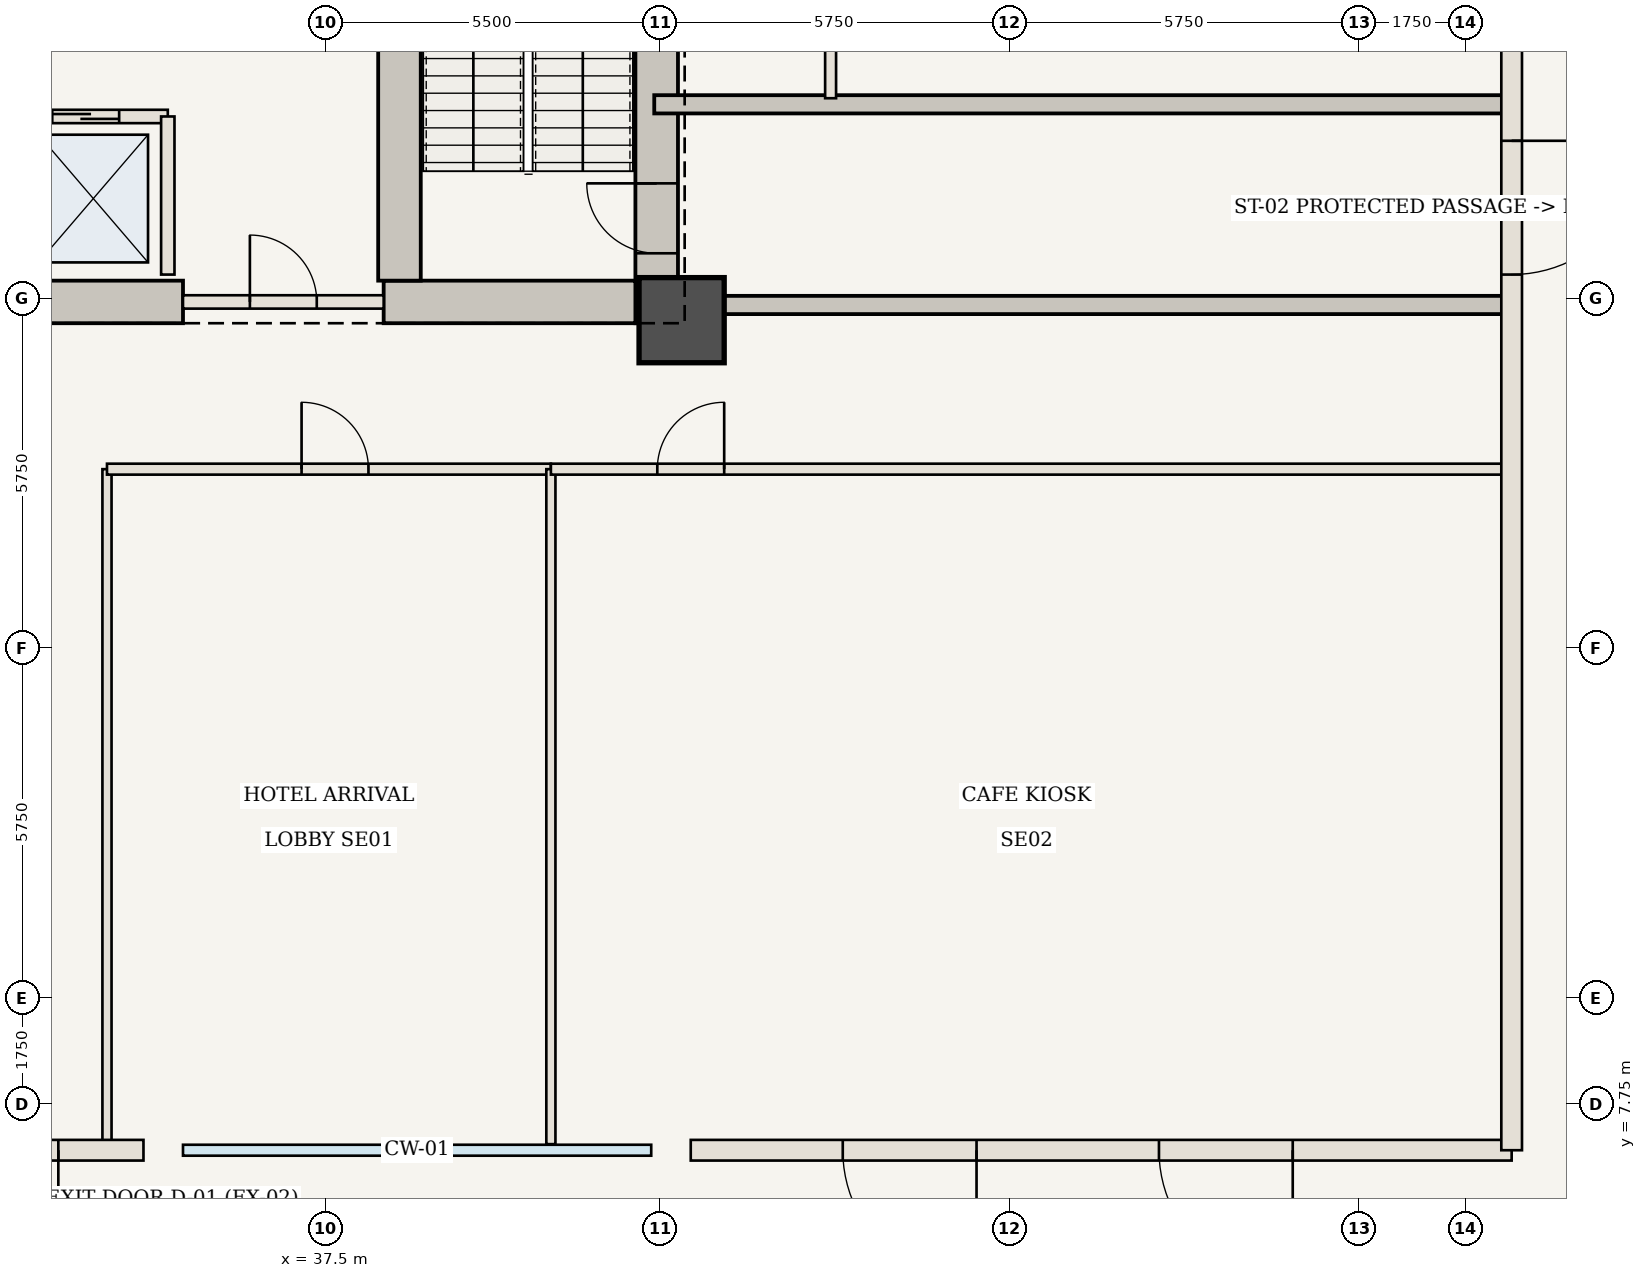
"""IFC4 building model, lengths in metres.
Left out: names, types, materials, properties, quantities, classifications, styles, units other than length and angle.
Written with IfcOpenShell. Run it as: python <this file> out.ifc"""

import sys

from ifc_helpers import new_model, si_unit, direction, frame, frame_2d, origin, origin_2d, place, context, subcontext, project, spatial, rectangle, extrude, element, fill, save


model = new_model("IFC4")
c1 = context("Model", 3, precision=1e-05, world=origin(), true_north=direction((0.0, 1.0)))
c2 = subcontext(c1, "Body", "Model", "MODEL_VIEW")
j1 = project(units=[si_unit("LENGTHUNIT", "METRE"), si_unit("PLANEANGLEUNIT", "RADIAN")], contexts=[c1])
p1 = place(None, origin())
s1 = spatial("IfcSite", under=j1, at=p1, CompositionType="ELEMENT")
p2 = place(p1, origin())
s2 = spatial("IfcBuilding", under=s1, at=p2, CompositionType="ELEMENT")
p3 = place(p2, origin())
s3 = spatial("IfcBuildingStorey", under=s2, at=p3, CompositionType="ELEMENT", Elevation=0.0)
p4 = place(p3, frame((42.94, 20.6, 0.0), z_axis=(0.0, 0.0, 1.0), x_axis=(0.0, 1.0, 0.0)))
e1 = element("IfcWall", 1, at=p4, inside=s3, PredefinedType="SHEAR", context=c2, shape_type="SweptSolid", body=[
    extrude(rectangle(XDim=10.0, YDim=0.7, at=frame_2d((5.0, 0.0))), origin(), (0.0, 0.0, 1.0), 6.65),
])
p5 = place(p4, frame((1.15, 0.0, 0.0)))
e2 = element("IfcOpeningElement", 2, at=p5, cuts=e1, PredefinedType="OPENING", context=c2, shape_type="SweptSolid", body=[
    extrude(rectangle(XDim=1.15, YDim=2.15, at=frame_2d((0.575, 1.075))), frame((0.0, 0.36, 0.0), z_axis=(0.0, -1.0, 0.0), x_axis=(1.0, 0.0, 0.0)), (0.0, 0.0, 1.0), 0.72),
])
p6 = place(p3, frame((21.41, 20.95, 0.0), z_axis=(0.0, 0.0, 1.0), x_axis=(1.0, 0.0, 0.0)))
e3 = element("IfcWall", 3, at=p6, inside=s3, PredefinedType="SHEAR", context=c2, shape_type="SweptSolid", body=[
    extrude(rectangle(XDim=13.74, YDim=0.7, at=frame_2d((6.87, 0.0))), origin(), (0.0, 0.0, 1.0), 6.65),
])
p7 = place(p3, frame((38.45, 20.95, 0.0), z_axis=(0.0, 0.0, 1.0), x_axis=(1.0, 0.0, 0.0)))
e4 = element("IfcWall", 4, at=p7, inside=s3, PredefinedType="SHEAR", context=c2, shape_type="SweptSolid", body=[
    extrude(rectangle(XDim=4.14, YDim=0.7, at=frame_2d((2.07, 0.0))), origin(), (0.0, 0.0, 1.0), 6.65),
])
p8 = place(p3, frame((38.71, 21.3, 0.0), z_axis=(0.0, 0.0, 1.0), x_axis=(0.0, 1.0, 0.0)))
e5 = element("IfcWall", 5, at=p8, inside=s3, PredefinedType="SHEAR", context=c2, shape_type="SweptSolid", body=[
    extrude(rectangle(XDim=9.3, YDim=0.7, at=frame_2d((4.65, 0.0))), origin(), (0.0, 0.0, 1.0), 6.65),
])
p9 = place(p3, frame((43.35, 20.65, 0.0), z_axis=(0.0, 0.0, 1.0), x_axis=(1.0, 0.0, 0.0)))
e6 = element("IfcColumn", 6, at=p9, inside=s3, PredefinedType="COLUMN", context=c2, shape_type="SweptSolid", body=[
    extrude(rectangle(XDim=1.4, YDim=1.4, at=origin_2d()), origin(), (0.0, 0.0, 1.0), 6.65),
])
p10 = place(p3, frame((35.15, 20.95, 0.0), z_axis=(0.0, 0.0, 1.0), x_axis=(1.0, 0.0, 0.0)))
e7 = element("IfcWall", 7, at=p10, inside=s3, PredefinedType="STANDARD", context=c2, shape_type="SweptSolid", body=[
    extrude(rectangle(XDim=3.3, YDim=0.22, at=frame_2d((1.65, 0.0))), origin(), (0.0, 0.0, 1.0), 6.41),
])
p11 = place(p10, frame((1.1, 0.0, 0.0)))
e8 = element("IfcOpeningElement", 8, at=p11, cuts=e7, PredefinedType="OPENING", context=c2, shape_type="SweptSolid", body=[
    extrude(rectangle(XDim=1.1, YDim=2.15, at=frame_2d((0.55, 1.075))), frame((0.0, 0.12, 0.0), z_axis=(0.0, -1.0, 0.0), x_axis=(1.0, 0.0, 0.0)), (0.0, 0.0, 1.0), 0.24),
])
p12 = place(p3, frame((25.65, 24.0, 0.0), z_axis=(0.0, 0.0, 1.0), x_axis=(1.0, 0.0, 0.0)))
e9 = element("IfcWall", 9, at=p12, inside=s3, PredefinedType="STANDARD", context=c2, shape_type="SweptSolid", body=[
    extrude(rectangle(XDim=9.25, YDim=0.22, at=frame_2d((4.625, 0.0))), origin(), (0.0, 0.0, 1.0), 6.41),
])
p13 = place(p12, frame((0.58, 0.0, 0.0)))
e10 = element("IfcOpeningElement", 10, at=p13, cuts=e9, PredefinedType="OPENING", context=c2, shape_type="SweptSolid", body=[
    extrude(rectangle(XDim=1.1, YDim=2.15, at=frame_2d((0.55, 1.075))), frame((0.0, 0.12, 0.0), z_axis=(0.0, -1.0, 0.0), x_axis=(1.0, 0.0, 0.0)), (0.0, 0.0, 1.0), 0.24),
])
p14 = place(p12, frame((2.75, 0.0, 0.0)))
e11 = element("IfcOpeningElement", 11, at=p14, cuts=e9, PredefinedType="OPENING", context=c2, shape_type="SweptSolid", body=[
    extrude(rectangle(XDim=1.1, YDim=2.15, at=frame_2d((0.55, 1.075))), frame((0.0, 0.12, 0.0), z_axis=(0.0, -1.0, 0.0), x_axis=(1.0, 0.0, 0.0)), (0.0, 0.0, 1.0), 0.24),
])
p15 = place(p12, frame((5.05, 0.0, 0.0)))
e12 = element("IfcOpeningElement", 12, at=p15, cuts=e9, PredefinedType="OPENING", context=c2, shape_type="SweptSolid", body=[
    extrude(rectangle(XDim=1.1, YDim=2.15, at=frame_2d((0.55, 1.075))), frame((0.0, 0.12, 0.0), z_axis=(0.0, -1.0, 0.0), x_axis=(1.0, 0.0, 0.0)), (0.0, 0.0, 1.0), 0.24),
])
p16 = place(p12, frame((7.35, 0.0, 0.0)))
e13 = element("IfcOpeningElement", 13, at=p16, cuts=e9, PredefinedType="OPENING", context=c2, shape_type="SweptSolid", body=[
    extrude(rectangle(XDim=1.1, YDim=2.15, at=frame_2d((0.55, 1.075))), frame((0.0, 0.12, 0.0), z_axis=(0.0, -1.0, 0.0), x_axis=(1.0, 0.0, 0.0)), (0.0, 0.0, 1.0), 0.24),
])
p17 = place(p3, frame((34.9, 21.4, 0.0), z_axis=(0.0, 0.0, 1.0), x_axis=(0.0, 1.0, 0.0)))
e14 = element("IfcWall", 14, at=p17, inside=s3, PredefinedType="STANDARD", context=c2, shape_type="SweptSolid", body=[
    extrude(rectangle(XDim=2.6, YDim=0.22, at=frame_2d((1.3, 0.0))), origin(), (0.0, 0.0, 1.0), 6.41),
])
for number, where, z_axis, x_axis in (
    (15, (42.9, 20.9, 0.0), (0.0, 0.0, 1.0), (1.0, 0.0, 0.0)),
    (16, (42.9, 24.2, 0.0), (0.0, 0.0, 1.0), (1.0, 0.0, 0.0)),
):
    element("IfcWall", number, at=place(p3, frame(where, z_axis=z_axis, x_axis=x_axis)), inside=s3, PredefinedType="SHEAR", context=c2, shape_type="SweptSolid", body=[
        extrude(rectangle(XDim=14.05, YDim=0.3, at=frame_2d((7.025, 0.0))), origin(), (0.0, 0.0, 1.0), 6.41),
    ])
p18 = place(p3, frame((33.9, 7.1, 0.0), z_axis=(0.0, 0.0, 1.0), x_axis=(0.0, 1.0, 0.0)))
e17 = element("IfcWall", 17, at=p18, inside=s3, PredefinedType="STANDARD", context=c2, shape_type="SweptSolid", body=[
    extrude(rectangle(XDim=11.1, YDim=0.15, at=frame_2d((5.55, 0.0))), origin(), (0.0, 0.0, 1.0), 6.41),
])
p19 = place(p3, frame((33.9, 18.2, 0.0), z_axis=(0.0, 0.0, 1.0), x_axis=(1.0, 0.0, 0.0)))
e18 = element("IfcWall", 18, at=p19, inside=s3, PredefinedType="STANDARD", context=c2, shape_type="SweptSolid", body=[
    extrude(rectangle(XDim=7.3, YDim=0.18, at=frame_2d((3.65, 0.0))), origin(), (0.0, 0.0, 1.0), 6.41),
])
p20 = place(p19, frame((3.2, 0.0, 0.0)))
e19 = element("IfcOpeningElement", 19, at=p20, cuts=e18, PredefinedType="OPENING", context=c2, shape_type="SweptSolid", body=[
    extrude(rectangle(XDim=1.1, YDim=2.15, at=frame_2d((0.55, 1.075))), frame((0.0, 0.1, 0.0), z_axis=(0.0, -1.0, 0.0), x_axis=(1.0, 0.0, 0.0)), (0.0, 0.0, 1.0), 0.2),
])
p21 = place(p3, frame((41.2, 7.1, 0.0), z_axis=(0.0, 0.0, 1.0), x_axis=(0.0, 1.0, 0.0)))
e20 = element("IfcWall", 20, at=p21, inside=s3, PredefinedType="STANDARD", context=c2, shape_type="SweptSolid", body=[
    extrude(rectangle(XDim=11.1, YDim=0.15, at=frame_2d((5.55, 0.0))), origin(), (0.0, 0.0, 1.0), 6.41),
])
p22 = place(p3, frame((41.2, 18.2, 0.0), z_axis=(0.0, 0.0, 1.0), x_axis=(1.0, 0.0, 0.0)))
e21 = element("IfcWall", 21, at=p22, inside=s3, PredefinedType="STANDARD", context=c2, shape_type="SweptSolid", body=[
    extrude(rectangle(XDim=15.65, YDim=0.18, at=frame_2d((7.825, 0.0))), origin(), (0.0, 0.0, 1.0), 6.41),
])
p23 = place(p22, frame((1.75, 0.0, 0.0)))
e22 = element("IfcOpeningElement", 22, at=p23, cuts=e21, PredefinedType="OPENING", context=c2, shape_type="SweptSolid", body=[
    extrude(rectangle(XDim=1.1, YDim=2.15, at=frame_2d((0.55, 1.075))), frame((0.0, 0.1, 0.0), z_axis=(0.0, -1.0, 0.0), x_axis=(1.0, 0.0, 0.0)), (0.0, 0.0, 1.0), 0.2),
])
p24 = place(p3, frame((45.8, 24.3, 0.0), z_axis=(0.0, 0.0, 1.0), x_axis=(0.0, 1.0, 0.0)))
e23 = element("IfcWall", 23, at=p24, inside=s3, PredefinedType="STANDARD", context=c2, shape_type="SweptSolid", body=[
    extrude(rectangle(XDim=10.7, YDim=0.18, at=frame_2d((5.35, 0.0))), origin(), (0.0, 0.0, 1.0), 6.41),
])
p25 = place(p24, frame((4.85, 0.0, 0.0)))
e24 = element("IfcOpeningElement", 24, at=p25, cuts=e23, PredefinedType="OPENING", context=c2, shape_type="SweptSolid", body=[
    extrude(rectangle(XDim=0.95, YDim=2.15, at=frame_2d((0.475, 1.075))), frame((0.0, 0.1, 0.0), z_axis=(0.0, -1.0, 0.0), x_axis=(1.0, 0.0, 0.0)), (0.0, 0.0, 1.0), 0.2),
])
p26 = place(p3, frame((34.5, 7.0, 0.0), z_axis=(0.0, 0.0, 1.0), x_axis=(-1.0, 0.0, 0.0)))
e25 = element("IfcWall", 25, at=p26, inside=s3, PredefinedType="USERDEFINED", context=c2, shape_type="SweptSolid", body=[
    extrude(rectangle(XDim=5.0, YDim=0.34, at=frame_2d((2.5, 0.0))), origin(), (0.0, 0.0, 1.0), 5.51),
])
p27 = place(p26, frame((1.4, 0.0, 0.0)))
e26 = element("IfcOpeningElement", 26, at=p27, cuts=e25, PredefinedType="OPENING", context=c2, shape_type="SweptSolid", body=[
    extrude(rectangle(XDim=2.2, YDim=2.4, at=frame_2d((1.1, 1.2))), frame((0.0, 0.18, 0.0), z_axis=(0.0, -1.0, 0.0), x_axis=(1.0, 0.0, 0.0)), (0.0, 0.0, 1.0), 0.36),
])
p28 = place(p3, frame((57.0, 7.0, 0.0), z_axis=(0.0, 0.0, 1.0), x_axis=(-1.0, 0.0, 0.0)))
e27 = element("IfcWall", 27, at=p28, inside=s3, PredefinedType="USERDEFINED", context=c2, shape_type="SweptSolid", body=[
    extrude(rectangle(XDim=13.5, YDim=0.34, at=frame_2d((6.75, 0.0))), origin(), (0.0, 0.0, 1.0), 5.51),
])
p29 = place(p28, frame((3.6, 0.0, 0.0)))
e28 = element("IfcOpeningElement", 28, at=p29, cuts=e27, PredefinedType="OPENING", context=c2, shape_type="SweptSolid", body=[
    extrude(rectangle(XDim=2.2, YDim=2.4, at=frame_2d((1.1, 1.2))), frame((0.0, 0.18, 0.0), z_axis=(0.0, -1.0, 0.0), x_axis=(1.0, 0.0, 0.0)), (0.0, 0.0, 1.0), 0.36),
])
p30 = place(p28, frame((8.8, 0.0, 0.0)))
e29 = element("IfcOpeningElement", 29, at=p30, cuts=e27, PredefinedType="OPENING", context=c2, shape_type="SweptSolid", body=[
    extrude(rectangle(XDim=2.2, YDim=2.4, at=frame_2d((1.1, 1.2))), frame((0.0, 0.18, 0.0), z_axis=(0.0, -1.0, 0.0), x_axis=(1.0, 0.0, 0.0)), (0.0, 0.0, 1.0), 0.36),
])
p31 = place(p3, frame((57.0, 36.0, 0.0), z_axis=(0.0, 0.0, 1.0), x_axis=(0.0, -1.0, 0.0)))
e30 = element("IfcWall", 30, at=p31, inside=s3, PredefinedType="USERDEFINED", context=c2, shape_type="SweptSolid", body=[
    extrude(rectangle(XDim=29.0, YDim=0.34, at=frame_2d((14.5, 0.0))), origin(), (0.0, 0.0, 1.0), 5.51),
])
p32 = place(p31, frame((12.4, 0.0, 0.0)))
e31 = element("IfcOpeningElement", 31, at=p32, cuts=e30, PredefinedType="OPENING", context=c2, shape_type="SweptSolid", body=[
    extrude(rectangle(XDim=2.2, YDim=2.4, at=frame_2d((1.1, 1.2))), frame((0.0, 0.18, 0.0), z_axis=(0.0, -1.0, 0.0), x_axis=(1.0, 0.0, 0.0)), (0.0, 0.0, 1.0), 0.36),
])
p33 = place(p31, frame((4.2, 0.0, 0.9)))
e32 = element("IfcOpeningElement", 32, at=p33, cuts=e30, PredefinedType="OPENING", context=c2, shape_type="SweptSolid", body=[
    extrude(rectangle(XDim=3.6, YDim=2.6, at=frame_2d((1.8, 1.3))), frame((0.0, 0.18, 0.0), z_axis=(0.0, -1.0, 0.0), x_axis=(1.0, 0.0, 0.0)), (0.0, 0.0, 1.0), 0.36),
])
p34 = place(p5, origin())
e33 = element("IfcDoor", 33, at=p34, inside=s3, OperationType="SINGLE_SWING_RIGHT", PredefinedType="DOOR", context=c2, shape_type="SweptSolid", body=[
    extrude(rectangle(XDim=1.15, YDim=2.15, at=frame_2d((0.575, 1.075))), frame((0.0, 0.025, 0.0), z_axis=(0.0, -1.0, 0.0), x_axis=(1.0, 0.0, 0.0)), (0.0, 0.0, 1.0), 0.05),
])
fill(e2, e33)
p35 = place(p11, origin())
e34 = element("IfcDoor", 34, at=p35, inside=s3, OperationType="SINGLE_SWING_LEFT", PredefinedType="DOOR", context=c2, shape_type="SweptSolid", body=[
    extrude(rectangle(XDim=1.1, YDim=2.15, at=frame_2d((0.55, 1.075))), frame((0.0, 0.025, 0.0), z_axis=(0.0, -1.0, 0.0), x_axis=(1.0, 0.0, 0.0)), (0.0, 0.0, 1.0), 0.05),
])
fill(e8, e34)
p36 = place(p16, origin())
e35 = element("IfcDoor", 35, at=p36, inside=s3, OperationType="DOUBLE_DOOR_SLIDING", PredefinedType="DOOR", context=c2, shape_type="SweptSolid", body=[
    extrude(rectangle(XDim=1.1, YDim=2.15, at=frame_2d((0.55, 1.075))), frame((0.0, 0.025, 0.0), z_axis=(0.0, -1.0, 0.0), x_axis=(1.0, 0.0, 0.0)), (0.0, 0.0, 1.0), 0.05),
])
fill(e13, e35)
p37 = place(p20, origin())
e36 = element("IfcDoor", 36, at=p37, inside=s3, OperationType="SINGLE_SWING_LEFT", PredefinedType="DOOR", context=c2, shape_type="SweptSolid", body=[
    extrude(rectangle(XDim=1.1, YDim=2.15, at=frame_2d((0.55, 1.075))), frame((0.0, 0.025, 0.0), z_axis=(0.0, -1.0, 0.0), x_axis=(1.0, 0.0, 0.0)), (0.0, 0.0, 1.0), 0.05),
])
fill(e19, e36)
p38 = place(p23, origin())
e37 = element("IfcDoor", 37, at=p38, inside=s3, OperationType="SINGLE_SWING_RIGHT", PredefinedType="DOOR", context=c2, shape_type="SweptSolid", body=[
    extrude(rectangle(XDim=1.1, YDim=2.15, at=frame_2d((0.55, 1.075))), frame((0.0, 0.025, 0.0), z_axis=(0.0, -1.0, 0.0), x_axis=(1.0, 0.0, 0.0)), (0.0, 0.0, 1.0), 0.05),
])
fill(e22, e37)
p39 = place(p27, origin())
e38 = element("IfcDoor", 38, at=p39, inside=s3, OperationType="DOUBLE_DOOR_SINGLE_SWING", PredefinedType="DOOR", context=c2, shape_type="SweptSolid", body=[
    extrude(rectangle(XDim=2.2, YDim=2.4, at=frame_2d((1.1, 1.2))), frame((0.0, 0.025, 0.0), z_axis=(0.0, -1.0, 0.0), x_axis=(1.0, 0.0, 0.0)), (0.0, 0.0, 1.0), 0.05),
])
fill(e26, e38)
p40 = place(p29, origin())
e39 = element("IfcDoor", 39, at=p40, inside=s3, OperationType="DOUBLE_DOOR_SINGLE_SWING", PredefinedType="DOOR", context=c2, shape_type="SweptSolid", body=[
    extrude(rectangle(XDim=2.2, YDim=2.4, at=frame_2d((1.1, 1.2))), frame((0.0, 0.025, 0.0), z_axis=(0.0, -1.0, 0.0), x_axis=(1.0, 0.0, 0.0)), (0.0, 0.0, 1.0), 0.05),
])
fill(e28, e39)
p41 = place(p30, origin())
e40 = element("IfcDoor", 40, at=p41, inside=s3, OperationType="DOUBLE_DOOR_SINGLE_SWING", PredefinedType="DOOR", context=c2, shape_type="SweptSolid", body=[
    extrude(rectangle(XDim=2.2, YDim=2.4, at=frame_2d((1.1, 1.2))), frame((0.0, 0.025, 0.0), z_axis=(0.0, -1.0, 0.0), x_axis=(1.0, 0.0, 0.0)), (0.0, 0.0, 1.0), 0.05),
])
fill(e29, e40)
p42 = place(p32, origin())
e41 = element("IfcDoor", 41, at=p42, inside=s3, OperationType="DOUBLE_DOOR_SINGLE_SWING", PredefinedType="DOOR", context=c2, shape_type="SweptSolid", body=[
    extrude(rectangle(XDim=2.2, YDim=2.4, at=frame_2d((1.1, 1.2))), frame((0.0, 0.025, 0.0), z_axis=(0.0, -1.0, 0.0), x_axis=(1.0, 0.0, 0.0)), (0.0, 0.0, 1.0), 0.05),
])
fill(e31, e41)
save(model, sys.argv[1])
